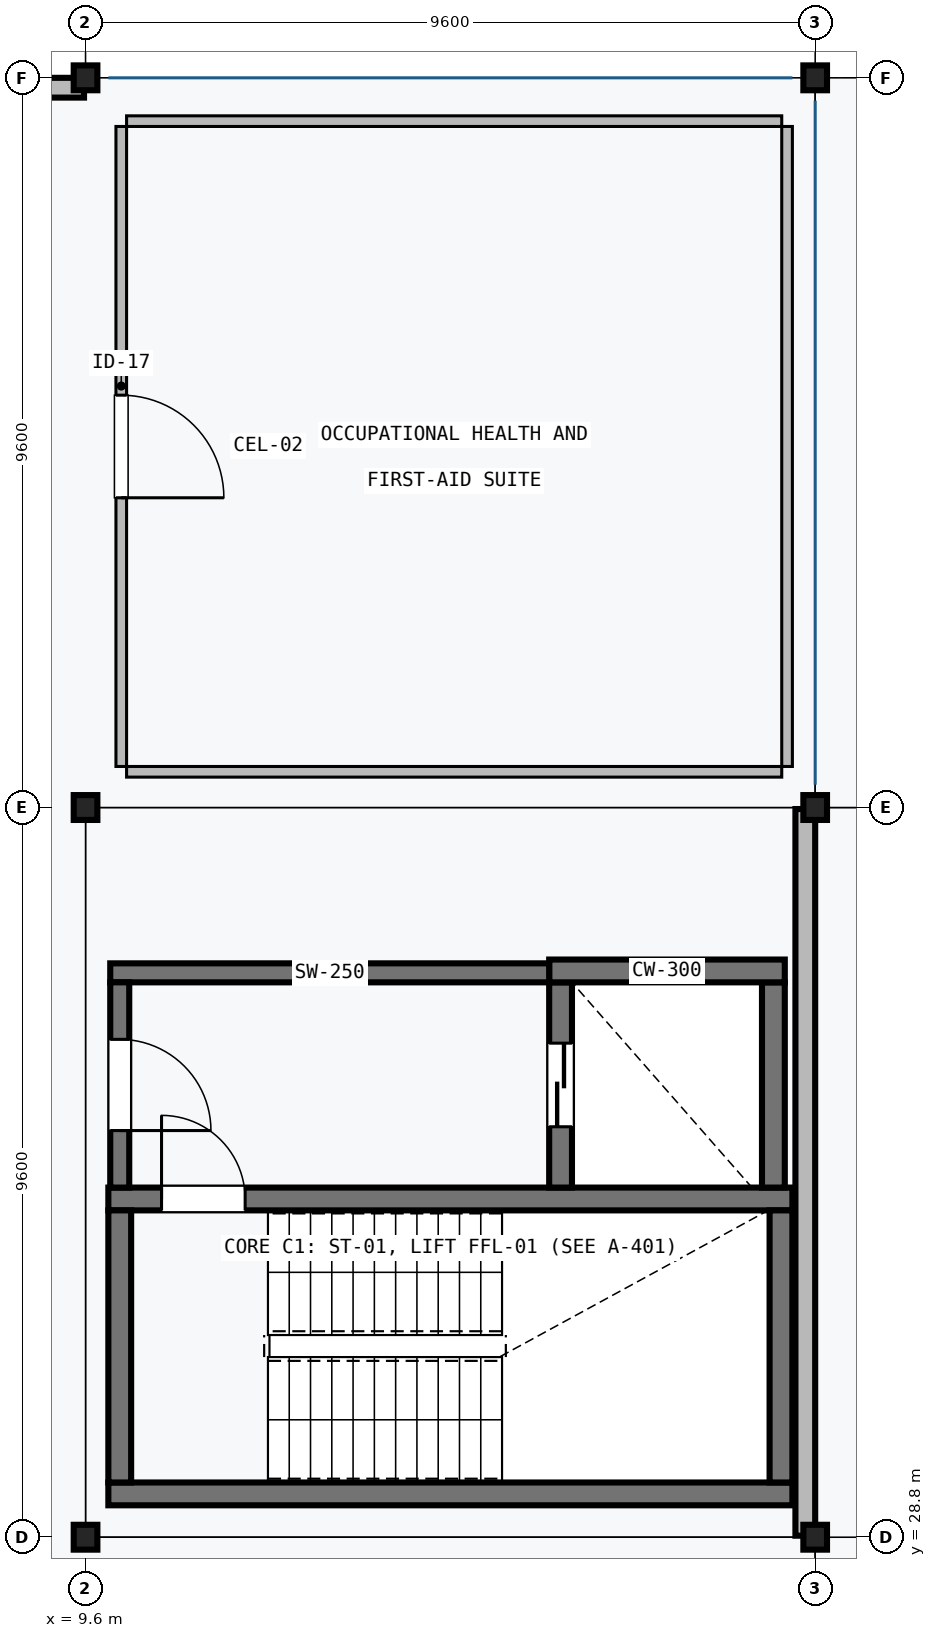
"""IFC4 building model, lengths in metres.
Left out: names, types, materials, properties, quantities, classifications, styles, units other than length and angle.
Written with IfcOpenShell. Run it as: python <this file> out.ifc"""

import sys

from ifc_helpers import new_model, si_unit, direction, frame, frame_2d, origin, origin_2d, place, context, subcontext, project, spatial, rectangle, i_section, extrude, element, fill, save


model = new_model("IFC4")
c1 = context("Model", 3, precision=1e-05, world=origin(), true_north=direction((0.0, 1.0)))
c2 = subcontext(c1, "Body", "Model", "MODEL_VIEW")
j1 = project(units=[si_unit("LENGTHUNIT", "METRE"), si_unit("PLANEANGLEUNIT", "RADIAN")], contexts=[c1])
p1 = place(None, origin())
s1 = spatial("IfcSite", under=j1, at=p1, CompositionType="ELEMENT")
p2 = place(p1, origin())
s2 = spatial("IfcBuilding", under=s1, at=p2, CompositionType="ELEMENT")
p3 = place(p2, frame((0.0, 0.0, 14.7)))
s3 = spatial("IfcBuildingStorey", under=s2, at=p3, CompositionType="ELEMENT", Elevation=14.7)
for number, where, z_axis, x_axis in (
    (1, (9.6, 28.8, 0.0), (0.0, 0.0, 1.0), (1.0, 0.0, 0.0)),
    (2, (9.6, 38.4, 0.0), (0.0, 0.0, 1.0), (1.0, 0.0, 0.0)),
    (3, (9.6, 48.0, 0.0), (0.0, 0.0, 1.0), (1.0, 0.0, 0.0)),
    (4, (19.2, 28.8, 0.0), (0.0, 0.0, 1.0), (1.0, 0.0, 0.0)),
    (5, (19.2, 38.4, 0.0), (0.0, 0.0, 1.0), (1.0, 0.0, 0.0)),
    (6, (19.2, 48.0, 0.0), (0.0, 0.0, 1.0), (1.0, 0.0, 0.0)),
):
    element("IfcColumn", number, at=place(p3, frame(where, z_axis=z_axis, x_axis=x_axis)), inside=s3, PredefinedType="COLUMN", context=c2, shape_type="SweptSolid", body=[
        extrude(i_section(OverallWidth=0.311, OverallDepth=0.327, WebThickness=0.016, FlangeThickness=0.025, FilletRadius=0.015, at=origin_2d()), origin(), (0.0, 0.0, 1.0), 3.95),
    ])
p4 = place(p3, frame((9.9, 29.37, 0.0), z_axis=(0.0, 0.0, 1.0), x_axis=(1.0, 0.0, 0.0)))
e7 = element("IfcWall", 7, at=p4, inside=s3, PredefinedType="SHEAR", context=c2, shape_type="SweptSolid", body=[
    extrude(rectangle(XDim=9.0, YDim=0.3, at=frame_2d((4.5, 0.0))), origin(), (0.0, 0.0, 1.0), 3.95),
])
p5 = place(p3, frame((18.9, 33.25, 0.0), z_axis=(0.0, 0.0, 1.0), x_axis=(-1.0, 0.0, 0.0)))
e8 = element("IfcWall", 8, at=p5, inside=s3, PredefinedType="SHEAR", context=c2, shape_type="SweptSolid", body=[
    extrude(rectangle(XDim=9.0, YDim=0.3, at=frame_2d((4.5, 0.0))), origin(), (0.0, 0.0, 1.0), 3.95),
])
p6 = place(p5, frame((7.2, 0.0, 0.0)))
e9 = element("IfcOpeningElement", 9, at=p6, cuts=e8, PredefinedType="OPENING", context=c2, shape_type="SweptSolid", body=[
    extrude(rectangle(XDim=1.1, YDim=2.15, at=frame_2d((0.55, 1.075))), frame((0.0, 0.16, 0.0), z_axis=(0.0, -1.0, 0.0), x_axis=(1.0, 0.0, 0.0)), (0.0, 0.0, 1.0), 0.32),
])
for number, where, z_axis, x_axis in (
    (10, (10.05, 29.52, 0.0), (0.0, 0.0, 1.0), (0.0, 1.0, 0.0)),
    (11, (18.75, 33.1, 0.0), (0.0, 0.0, 1.0), (0.0, -1.0, 0.0)),
):
    element("IfcWall", number, at=place(p3, frame(where, z_axis=z_axis, x_axis=x_axis)), inside=s3, PredefinedType="SHEAR", context=c2, shape_type="SweptSolid", body=[
        extrude(rectangle(XDim=3.58, YDim=0.3, at=frame_2d((1.79, 0.0))), origin(), (0.0, 0.0, 1.0), 3.95),
    ])
p7 = place(p3, frame((15.85, 36.1, 0.0), z_axis=(0.0, 0.0, 1.0), x_axis=(0.0, -1.0, 0.0)))
e12 = element("IfcWall", 12, at=p7, inside=s3, PredefinedType="SHEAR", context=c2, shape_type="SweptSolid", body=[
    extrude(rectangle(XDim=2.7, YDim=0.3, at=frame_2d((1.35, 0.0))), origin(), (0.0, 0.0, 1.0), 3.95),
])
p8 = place(p7, frame((0.8, 0.0, 0.0)))
e13 = element("IfcOpeningElement", 13, at=p8, cuts=e12, PredefinedType="OPENING", context=c2, shape_type="SweptSolid", body=[
    extrude(rectangle(XDim=1.1, YDim=2.1, at=frame_2d((0.55, 1.05))), frame((0.0, 0.16, 0.0), z_axis=(0.0, -1.0, 0.0), x_axis=(1.0, 0.0, 0.0)), (0.0, 0.0, 1.0), 0.32),
])
p9 = place(p3, frame((18.65, 33.4, 0.0), z_axis=(0.0, 0.0, 1.0), x_axis=(0.0, 1.0, 0.0)))
e14 = element("IfcWall", 14, at=p9, inside=s3, PredefinedType="SHEAR", context=c2, shape_type="SweptSolid", body=[
    extrude(rectangle(XDim=2.7, YDim=0.3, at=frame_2d((1.35, 0.0))), origin(), (0.0, 0.0, 1.0), 3.95),
])
p10 = place(p3, frame((15.7, 36.25, 0.0), z_axis=(0.0, 0.0, 1.0), x_axis=(1.0, 0.0, 0.0)))
e15 = element("IfcWall", 15, at=p10, inside=s3, PredefinedType="SHEAR", context=c2, shape_type="SweptSolid", body=[
    extrude(rectangle(XDim=3.1, YDim=0.3, at=frame_2d((1.55, 0.0))), origin(), (0.0, 0.0, 1.0), 3.95),
])
p11 = place(p3, frame((15.7, 36.225, 0.0), z_axis=(0.0, 0.0, 1.0), x_axis=(-1.0, 0.0, 0.0)))
e16 = element("IfcWall", 16, at=p11, inside=s3, PredefinedType="SHEAR", context=c2, shape_type="SweptSolid", body=[
    extrude(rectangle(XDim=5.775, YDim=0.25, at=frame_2d((2.887, 0.0))), origin(), (0.0, 0.0, 1.0), 3.95),
])
p12 = place(p3, frame((10.05, 33.4, 0.0), z_axis=(0.0, 0.0, 1.0), x_axis=(0.0, 1.0, 0.0)))
e17 = element("IfcWall", 17, at=p12, inside=s3, PredefinedType="SHEAR", context=c2, shape_type="SweptSolid", body=[
    extrude(rectangle(XDim=2.7, YDim=0.25, at=frame_2d((1.35, 0.0))), origin(), (0.0, 0.0, 1.0), 3.95),
])
p13 = place(p12, frame((0.75, 0.0, 0.0)))
e18 = element("IfcOpeningElement", 18, at=p13, cuts=e17, PredefinedType="OPENING", context=c2, shape_type="SweptSolid", body=[
    extrude(rectangle(XDim=1.2, YDim=2.15, at=frame_2d((0.6, 1.075))), frame((0.0, 0.135, 0.0), z_axis=(0.0, -1.0, 0.0), x_axis=(1.0, 0.0, 0.0)), (0.0, 0.0, 1.0), 0.27),
])
p14 = place(p3, frame((0.02, 47.87, 0.0), z_axis=(0.0, 0.0, 1.0), x_axis=(1.0, 0.0, 0.0)))
e19 = element("IfcWall", 19, at=p14, inside=s3, PredefinedType="SOLIDWALL", context=c2, shape_type="SweptSolid", body=[
    extrude(rectangle(XDim=9.56, YDim=0.26, at=frame_2d((4.78, 0.0))), origin(), (0.0, 0.0, 1.0), 3.66),
])
p15 = place(p14, frame((3.355, 0.0, 0.9)))
e20 = element("IfcOpeningElement", 20, at=p15, cuts=e19, PredefinedType="OPENING", context=c2, shape_type="SweptSolid", body=[
    extrude(rectangle(XDim=2.85, YDim=2.1, at=frame_2d((1.425, 1.05))), frame((0.0, 0.14, 0.0), z_axis=(0.0, -1.0, 0.0), x_axis=(1.0, 0.0, 0.0)), (0.0, 0.0, 1.0), 0.28),
])
p16 = place(p3, frame((19.07, 38.38, 0.0), z_axis=(0.0, 0.0, 1.0), x_axis=(0.0, -1.0, 0.0)))
e21 = element("IfcWall", 21, at=p16, inside=s3, PredefinedType="SOLIDWALL", context=c2, shape_type="SweptSolid", body=[
    extrude(rectangle(XDim=9.56, YDim=0.26, at=frame_2d((4.78, 0.0))), origin(), (0.0, 0.0, 1.0), 3.493),
])
for number, where, z_axis, x_axis in (
    (22, (18.76, 38.87, 0.0), (0.0, 0.0, 1.0), (-1.0, 0.0, 0.0)),
    (23, (10.14, 47.43, 0.0), (0.0, 0.0, 1.0), (1.0, 0.0, 0.0)),
):
    element("IfcWall", number, at=place(p3, frame(where, z_axis=z_axis, x_axis=x_axis)), inside=s3, PredefinedType="PARTITIONING", context=c2, shape_type="SweptSolid", body=[
        extrude(rectangle(XDim=8.62, YDim=0.14, at=frame_2d((4.31, 0.0))), origin(), (0.0, 0.0, 1.0), 3.59),
    ])
p17 = place(p3, frame((10.07, 38.94, 0.0), z_axis=(0.0, 0.0, 1.0), x_axis=(0.0, 1.0, 0.0)))
e24 = element("IfcWall", 24, at=p17, inside=s3, PredefinedType="PARTITIONING", context=c2, shape_type="SweptSolid", body=[
    extrude(rectangle(XDim=8.42, YDim=0.14, at=frame_2d((4.21, 0.0))), origin(), (0.0, 0.0, 1.0), 3.59),
])
p18 = place(p17, frame((3.535, 0.0, 0.0)))
e25 = element("IfcOpeningElement", 25, at=p18, cuts=e24, PredefinedType="OPENING", context=c2, shape_type="SweptSolid", body=[
    extrude(rectangle(XDim=1.35, YDim=2.25, at=frame_2d((0.675, 1.125))), frame((0.0, 0.08, 0.0), z_axis=(0.0, -1.0, 0.0), x_axis=(1.0, 0.0, 0.0)), (0.0, 0.0, 1.0), 0.16),
])
p19 = place(p3, frame((18.83, 47.36, 0.0), z_axis=(0.0, 0.0, 1.0), x_axis=(0.0, -1.0, 0.0)))
e26 = element("IfcWall", 26, at=p19, inside=s3, PredefinedType="PARTITIONING", context=c2, shape_type="SweptSolid", body=[
    extrude(rectangle(XDim=8.42, YDim=0.14, at=frame_2d((4.21, 0.0))), origin(), (0.0, 0.0, 1.0), 3.59),
])
p20 = place(p6, frame((1.1, 0.0, 0.0), z_axis=(0.0, 0.0, 1.0), x_axis=(-1.0, 0.0, 0.0)))
e27 = element("IfcDoor", 27, at=p20, inside=s3, OperationType="SINGLE_SWING_RIGHT", PredefinedType="DOOR", context=c2, shape_type="SweptSolid", body=[
    extrude(rectangle(XDim=1.1, YDim=2.15, at=frame_2d((0.55, 1.075))), frame((0.0, 0.025, 0.0), z_axis=(0.0, -1.0, 0.0), x_axis=(1.0, 0.0, 0.0)), (0.0, 0.0, 1.0), 0.05),
])
fill(e9, e27)
p21 = place(p8, frame((1.1, 0.0, 0.0), z_axis=(0.0, 0.0, 1.0), x_axis=(-1.0, 0.0, 0.0)))
e28 = element("IfcDoor", 28, at=p21, inside=s3, OperationType="DOUBLE_DOOR_SLIDING", PredefinedType="DOOR", context=c2, shape_type="SweptSolid", body=[
    extrude(rectangle(XDim=1.1, YDim=2.1, at=frame_2d((0.55, 1.05))), frame((0.0, 0.025, 0.0), z_axis=(0.0, -1.0, 0.0), x_axis=(1.0, 0.0, 0.0)), (0.0, 0.0, 1.0), 0.05),
])
fill(e13, e28)
p22 = place(p13, frame((1.2, 0.0, 0.0), z_axis=(0.0, 0.0, 1.0), x_axis=(-1.0, 0.0, 0.0)))
e29 = element("IfcDoor", 29, at=p22, inside=s3, OperationType="SINGLE_SWING_LEFT", PredefinedType="DOOR", context=c2, shape_type="SweptSolid", body=[
    extrude(rectangle(XDim=1.2, YDim=2.15, at=frame_2d((0.6, 1.075))), frame((0.0, 0.025, 0.0), z_axis=(0.0, -1.0, 0.0), x_axis=(1.0, 0.0, 0.0)), (0.0, 0.0, 1.0), 0.05),
])
fill(e18, e29)
p23 = place(p18, frame((1.35, 0.0, 0.0), z_axis=(0.0, 0.0, 1.0), x_axis=(-1.0, 0.0, 0.0)))
e30 = element("IfcDoor", 30, at=p23, inside=s3, OperationType="SINGLE_SWING_LEFT", PredefinedType="DOOR", context=c2, shape_type="SweptSolid", body=[
    extrude(rectangle(XDim=1.35, YDim=2.25, at=frame_2d((0.675, 1.125))), frame((0.0, 0.025, 0.0), z_axis=(0.0, -1.0, 0.0), x_axis=(1.0, 0.0, 0.0)), (0.0, 0.0, 1.0), 0.05),
])
fill(e25, e30)
save(model, sys.argv[1])
